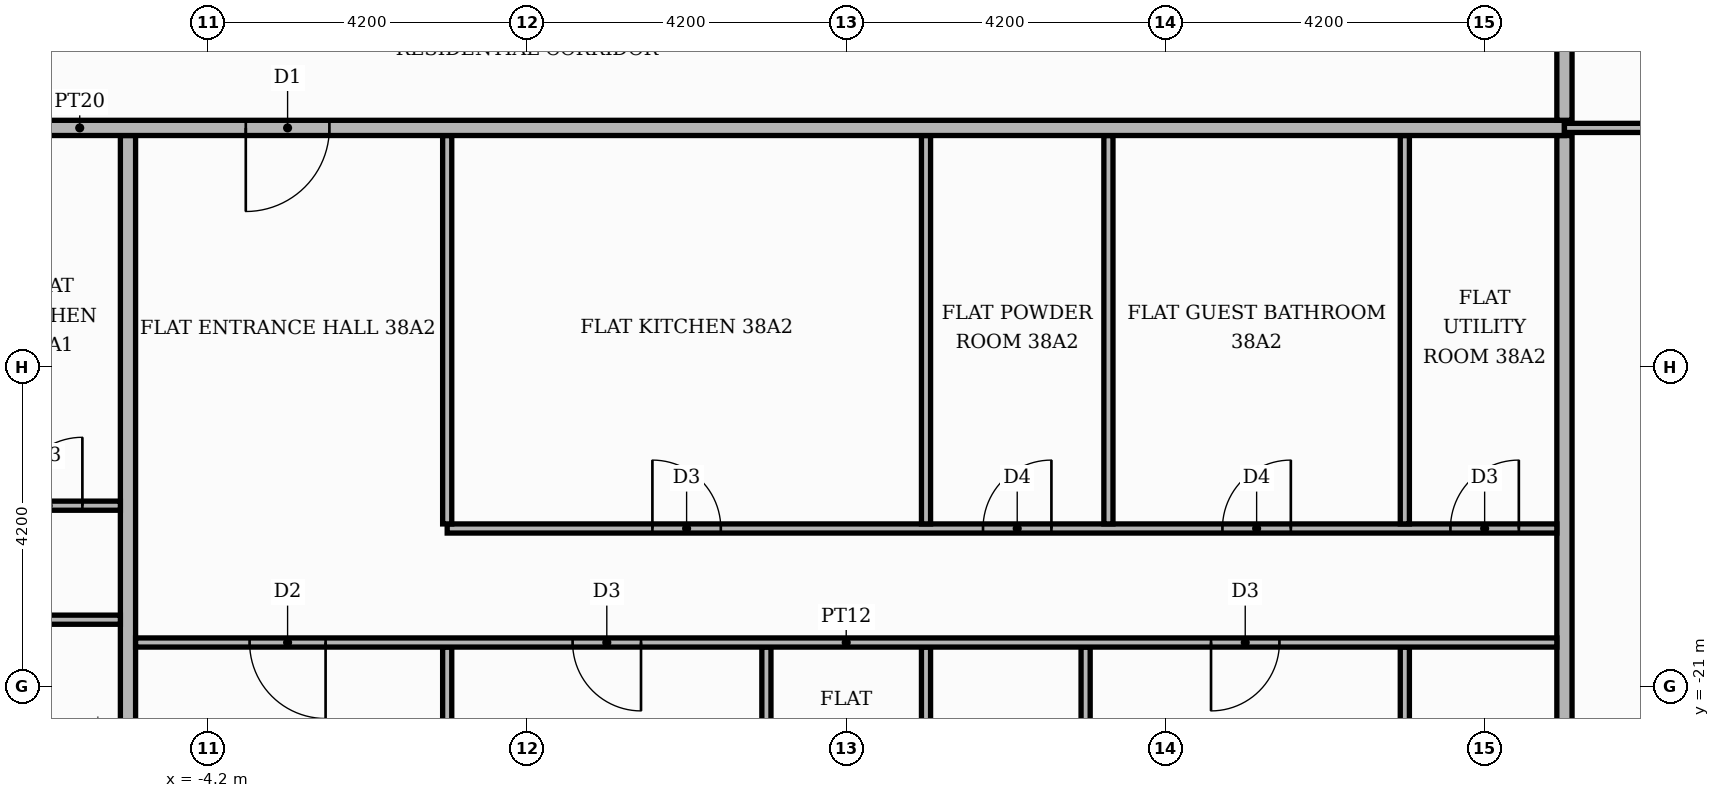
"""IFC4 building model, lengths in metres.
Left out: names, types, materials, properties, quantities, classifications, styles, units other than length and angle.
Written with IfcOpenShell. Run it as: python <this file> out.ifc"""

import sys

from ifc_helpers import new_model, si_unit, direction, frame, frame_2d, origin, place, context, subcontext, project, spatial, rectangle, extrude, element, fill, save


model = new_model("IFC4")
c1 = context("Model", 3, precision=1e-05, world=origin(), true_north=direction((0.0, 1.0)))
c2 = subcontext(c1, "Body", "Model", "MODEL_VIEW")
j1 = project(units=[si_unit("LENGTHUNIT", "METRE"), si_unit("PLANEANGLEUNIT", "RADIAN")], contexts=[c1])
p1 = place(None, origin())
s1 = spatial("IfcSite", under=j1, at=p1, CompositionType="ELEMENT")
p2 = place(p1, origin())
s2 = spatial("IfcBuilding", under=s1, at=p2, CompositionType="ELEMENT")
p3 = place(p2, frame((0.0, 0.0, 161.1)))
s3 = spatial("IfcBuildingStorey", under=s2, at=p3, CompositionType="ELEMENT", Elevation=161.1)
p4 = place(p3, frame((-5.25, -25.42, 0.0), z_axis=(0.0, 0.0, 1.0), x_axis=(0.0, 1.0, 0.0)))
e1 = element("IfcWall", 1, at=p4, inside=s3, PredefinedType="PARTITIONING", context=c2, shape_type="SweptSolid", body=[
    extrude(rectangle(XDim=11.67, YDim=0.2, at=frame_2d((5.835, 0.0))), origin(), (0.0, 0.0, 1.0), 3.48),
])
p5 = place(p3, frame((-1.05, -25.42, 0.0), z_axis=(0.0, 0.0, 1.0), x_axis=(0.0, 1.0, 0.0)))
e2 = element("IfcWall", 2, at=p5, inside=s3, PredefinedType="PARTITIONING", context=c2, shape_type="SweptSolid", body=[
    extrude(rectangle(XDim=4.94, YDim=0.12, at=frame_2d((2.47, 0.0))), origin(), (0.0, 0.0, 1.0), 3.48),
])
p6 = place(p3, frame((3.15, -25.42, 0.0), z_axis=(0.0, 0.0, 1.0), x_axis=(0.0, 1.0, 0.0)))
e3 = element("IfcWall", 3, at=p6, inside=s3, PredefinedType="PARTITIONING", context=c2, shape_type="SweptSolid", body=[
    extrude(rectangle(XDim=4.94, YDim=0.12, at=frame_2d((2.47, 0.0))), origin(), (0.0, 0.0, 1.0), 3.48),
])
p7 = place(p6, frame((1.9, 0.0, 0.0)))
e4 = element("IfcOpeningElement", 4, at=p7, cuts=e3, PredefinedType="OPENING", context=c2, shape_type="SweptSolid", body=[
    extrude(rectangle(XDim=0.9, YDim=2.1, at=frame_2d((0.45, 1.05))), frame((0.0, 0.07, 0.0), z_axis=(0.0, -1.0, 0.0), x_axis=(1.0, 0.0, 0.0)), (0.0, 0.0, 1.0), 0.14),
])
p8 = place(p3, frame((5.25, -25.42, 0.0), z_axis=(0.0, 0.0, 1.0), x_axis=(0.0, 1.0, 0.0)))
e5 = element("IfcWall", 5, at=p8, inside=s3, PredefinedType="PARTITIONING", context=c2, shape_type="SweptSolid", body=[
    extrude(rectangle(XDim=4.94, YDim=0.12, at=frame_2d((2.47, 0.0))), origin(), (0.0, 0.0, 1.0), 3.48),
])
p9 = place(p8, frame((1.9, 0.0, 0.0)))
e6 = element("IfcOpeningElement", 6, at=p9, cuts=e5, PredefinedType="OPENING", context=c2, shape_type="SweptSolid", body=[
    extrude(rectangle(XDim=0.9, YDim=2.1, at=frame_2d((0.45, 1.05))), frame((0.0, 0.07, 0.0), z_axis=(0.0, -1.0, 0.0), x_axis=(1.0, 0.0, 0.0)), (0.0, 0.0, 1.0), 0.14),
])
p10 = place(p3, frame((7.35, -25.42, 0.0), z_axis=(0.0, 0.0, 1.0), x_axis=(0.0, 1.0, 0.0)))
e7 = element("IfcWall", 7, at=p10, inside=s3, PredefinedType="PARTITIONING", context=c2, shape_type="SweptSolid", body=[
    extrude(rectangle(XDim=4.94, YDim=0.12, at=frame_2d((2.47, 0.0))), origin(), (0.0, 0.0, 1.0), 3.48),
])
p11 = place(p3, frame((11.55, -25.42, 0.0), z_axis=(0.0, 0.0, 1.0), x_axis=(0.0, 1.0, 0.0)))
e8 = element("IfcWall", 8, at=p11, inside=s3, PredefinedType="PARTITIONING", context=c2, shape_type="SweptSolid", body=[
    extrude(rectangle(XDim=4.94, YDim=0.12, at=frame_2d((2.47, 0.0))), origin(), (0.0, 0.0, 1.0), 3.48),
])
p12 = place(p11, frame((1.9, 0.0, 0.0)))
e9 = element("IfcOpeningElement", 9, at=p12, cuts=e8, PredefinedType="OPENING", context=c2, shape_type="SweptSolid", body=[
    extrude(rectangle(XDim=0.9, YDim=2.1, at=frame_2d((0.45, 1.05))), frame((0.0, 0.07, 0.0), z_axis=(0.0, -1.0, 0.0), x_axis=(1.0, 0.0, 0.0)), (0.0, 0.0, 1.0), 0.14),
])
p13 = place(p3, frame((13.65, -25.42, 0.0), z_axis=(0.0, 0.0, 1.0), x_axis=(0.0, 1.0, 0.0)))
e10 = element("IfcWall", 10, at=p13, inside=s3, PredefinedType="PARTITIONING", context=c2, shape_type="SweptSolid", body=[
    extrude(rectangle(XDim=11.67, YDim=0.2, at=frame_2d((5.835, 0.0))), origin(), (0.0, 0.0, 1.0), 3.48),
])
p14 = place(p3, frame((-5.15, -20.42, 0.0), z_axis=(0.0, 0.0, 1.0), x_axis=(1.0, 0.0, 0.0)))
e11 = element("IfcWall", 11, at=p14, inside=s3, PredefinedType="PARTITIONING", context=c2, shape_type="SweptSolid", body=[
    extrude(rectangle(XDim=18.7, YDim=0.12, at=frame_2d((9.35, 0.0))), origin(), (0.0, 0.0, 1.0), 3.48),
])
p15 = place(p14, frame((1.5, 0.0, 0.0)))
e12 = element("IfcOpeningElement", 12, at=p15, cuts=e11, PredefinedType="OPENING", context=c2, shape_type="SweptSolid", body=[
    extrude(rectangle(XDim=1.0, YDim=2.1, at=frame_2d((0.5, 1.05))), frame((0.0, 0.07, 0.0), z_axis=(0.0, -1.0, 0.0), x_axis=(1.0, 0.0, 0.0)), (0.0, 0.0, 1.0), 0.14),
])
p16 = place(p14, frame((5.75, 0.0, 0.0)))
e13 = element("IfcOpeningElement", 13, at=p16, cuts=e11, PredefinedType="OPENING", context=c2, shape_type="SweptSolid", body=[
    extrude(rectangle(XDim=0.9, YDim=2.1, at=frame_2d((0.45, 1.05))), frame((0.0, 0.07, 0.0), z_axis=(0.0, -1.0, 0.0), x_axis=(1.0, 0.0, 0.0)), (0.0, 0.0, 1.0), 0.14),
])
p17 = place(p14, frame((14.15, 0.0, 0.0)))
e14 = element("IfcOpeningElement", 14, at=p17, cuts=e11, PredefinedType="OPENING", context=c2, shape_type="SweptSolid", body=[
    extrude(rectangle(XDim=0.9, YDim=2.1, at=frame_2d((0.45, 1.05))), frame((0.0, 0.07, 0.0), z_axis=(0.0, -1.0, 0.0), x_axis=(1.0, 0.0, 0.0)), (0.0, 0.0, 1.0), 0.14),
])
p18 = place(p3, frame((-25.42, -20.12, 0.0), z_axis=(0.0, 0.0, 1.0), x_axis=(1.0, 0.0, 0.0)))
e15 = element("IfcWall", 15, at=p18, inside=s3, PredefinedType="PARTITIONING", context=c2, shape_type="SweptSolid", body=[
    extrude(rectangle(XDim=20.07, YDim=0.12, at=frame_2d((10.035, 0.0))), origin(), (0.0, 0.0, 1.0), 3.48),
])
p19 = place(p18, frame((10.22, 0.0, 0.0)))
e16 = element("IfcOpeningElement", 16, at=p19, cuts=e15, PredefinedType="OPENING", context=c2, shape_type="SweptSolid", body=[
    extrude(rectangle(XDim=1.0, YDim=2.1, at=frame_2d((0.5, 1.05))), frame((0.0, 0.07, 0.0), z_axis=(0.0, -1.0, 0.0), x_axis=(1.0, 0.0, 0.0)), (0.0, 0.0, 1.0), 0.14),
])
p20 = place(p18, frame((13.42, 0.0, 0.0)))
e17 = element("IfcOpeningElement", 17, at=p20, cuts=e15, PredefinedType="OPENING", context=c2, shape_type="SweptSolid", body=[
    extrude(rectangle(XDim=0.9, YDim=2.1, at=frame_2d((0.45, 1.05))), frame((0.0, 0.07, 0.0), z_axis=(0.0, -1.0, 0.0), x_axis=(1.0, 0.0, 0.0)), (0.0, 0.0, 1.0), 0.14),
])
p21 = place(p3, frame((-1.05, -18.92, 0.0), z_axis=(0.0, 0.0, 1.0), x_axis=(1.0, 0.0, 0.0)))
e18 = element("IfcWall", 18, at=p21, inside=s3, PredefinedType="PARTITIONING", context=c2, shape_type="SweptSolid", body=[
    extrude(rectangle(XDim=14.6, YDim=0.12, at=frame_2d((7.3, 0.0))), origin(), (0.0, 0.0, 1.0), 3.48),
])
p22 = place(p21, frame((2.7, 0.0, 0.0)))
e19 = element("IfcOpeningElement", 19, at=p22, cuts=e18, PredefinedType="OPENING", context=c2, shape_type="SweptSolid", body=[
    extrude(rectangle(XDim=0.9, YDim=2.1, at=frame_2d((0.45, 1.05))), frame((0.0, 0.07, 0.0), z_axis=(0.0, -1.0, 0.0), x_axis=(1.0, 0.0, 0.0)), (0.0, 0.0, 1.0), 0.14),
])
p23 = place(p21, frame((7.05, 0.0, 0.0)))
e20 = element("IfcOpeningElement", 20, at=p23, cuts=e18, PredefinedType="OPENING", context=c2, shape_type="SweptSolid", body=[
    extrude(rectangle(XDim=0.9, YDim=2.1, at=frame_2d((0.45, 1.05))), frame((0.0, 0.07, 0.0), z_axis=(0.0, -1.0, 0.0), x_axis=(1.0, 0.0, 0.0)), (0.0, 0.0, 1.0), 0.14),
])
p24 = place(p21, frame((10.2, 0.0, 0.0)))
e21 = element("IfcOpeningElement", 21, at=p24, cuts=e18, PredefinedType="OPENING", context=c2, shape_type="SweptSolid", body=[
    extrude(rectangle(XDim=0.9, YDim=2.1, at=frame_2d((0.45, 1.05))), frame((0.0, 0.07, 0.0), z_axis=(0.0, -1.0, 0.0), x_axis=(1.0, 0.0, 0.0)), (0.0, 0.0, 1.0), 0.14),
])
p25 = place(p21, frame((13.2, 0.0, 0.0)))
e22 = element("IfcOpeningElement", 22, at=p25, cuts=e18, PredefinedType="OPENING", context=c2, shape_type="SweptSolid", body=[
    extrude(rectangle(XDim=0.9, YDim=2.1, at=frame_2d((0.45, 1.05))), frame((0.0, 0.07, 0.0), z_axis=(0.0, -1.0, 0.0), x_axis=(1.0, 0.0, 0.0)), (0.0, 0.0, 1.0), 0.14),
])
for number, where, z_axis, x_axis in (
    (23, (-1.05, -18.86, 0.0), (0.0, 0.0, 1.0), (0.0, 1.0, 0.0)),
    (24, (5.25, -18.86, 0.0), (0.0, 0.0, 1.0), (0.0, 1.0, 0.0)),
    (25, (7.65, -18.86, 0.0), (0.0, 0.0, 1.0), (0.0, 1.0, 0.0)),
    (26, (11.55, -18.86, 0.0), (0.0, 0.0, 1.0), (0.0, 1.0, 0.0)),
):
    element("IfcWall", number, at=place(p3, frame(where, z_axis=z_axis, x_axis=x_axis)), inside=s3, PredefinedType="PARTITIONING", context=c2, shape_type="SweptSolid", body=[
        extrude(rectangle(XDim=5.11, YDim=0.12, at=frame_2d((2.555, 0.0))), origin(), (0.0, 0.0, 1.0), 3.48),
    ])
p26 = place(p3, frame((-9.45, -18.62, 0.0), z_axis=(0.0, 0.0, 1.0), x_axis=(1.0, 0.0, 0.0)))
e27 = element("IfcWall", 27, at=p26, inside=s3, PredefinedType="PARTITIONING", context=c2, shape_type="SweptSolid", body=[
    extrude(rectangle(XDim=4.1, YDim=0.12, at=frame_2d((2.05, 0.0))), origin(), (0.0, 0.0, 1.0), 3.48),
])
p27 = place(p26, frame((2.7, 0.0, 0.0)))
e28 = element("IfcOpeningElement", 28, at=p27, cuts=e27, PredefinedType="OPENING", context=c2, shape_type="SweptSolid", body=[
    extrude(rectangle(XDim=0.9, YDim=2.1, at=frame_2d((0.45, 1.05))), frame((0.0, 0.07, 0.0), z_axis=(0.0, -1.0, 0.0), x_axis=(1.0, 0.0, 0.0)), (0.0, 0.0, 1.0), 0.14),
])
p28 = place(p3, frame((-25.42, -13.65, 0.0), z_axis=(0.0, 0.0, 1.0), x_axis=(1.0, 0.0, 0.0)))
e29 = element("IfcWall", 29, at=p28, inside=s3, PredefinedType="PARTITIONING", context=c2, shape_type="SweptSolid", body=[
    extrude(rectangle(XDim=39.07, YDim=0.2, at=frame_2d((19.535, 0.0))), origin(), (0.0, 0.0, 1.0), 3.48),
])
p29 = place(p28, frame((13.32, 0.0, 0.0)))
e30 = element("IfcOpeningElement", 30, at=p29, cuts=e29, PredefinedType="OPENING", context=c2, shape_type="SweptSolid", body=[
    extrude(rectangle(XDim=1.1, YDim=2.4, at=frame_2d((0.55, 1.2))), frame((0.0, 0.11, 0.0), z_axis=(0.0, -1.0, 0.0), x_axis=(1.0, 0.0, 0.0)), (0.0, 0.0, 1.0), 0.22),
])
p30 = place(p28, frame((21.72, 0.0, 0.0)))
e31 = element("IfcOpeningElement", 31, at=p30, cuts=e29, PredefinedType="OPENING", context=c2, shape_type="SweptSolid", body=[
    extrude(rectangle(XDim=1.1, YDim=2.4, at=frame_2d((0.55, 1.2))), frame((0.0, 0.11, 0.0), z_axis=(0.0, -1.0, 0.0), x_axis=(1.0, 0.0, 0.0)), (0.0, 0.0, 1.0), 0.22),
])
p31 = place(p3, frame((13.65, -13.65, 0.0), z_axis=(0.0, 0.0, 1.0), x_axis=(1.0, 0.0, 0.0)))
e32 = element("IfcWall", 32, at=p31, inside=s3, PredefinedType="PARTITIONING", context=c2, shape_type="SweptSolid", body=[
    extrude(rectangle(XDim=6.47, YDim=0.12, at=frame_2d((3.235, 0.0))), origin(), (0.0, 0.0, 1.0), 3.48),
])
p32 = place(p31, frame((2.785, 0.0, 0.0)))
e33 = element("IfcOpeningElement", 33, at=p32, cuts=e32, PredefinedType="OPENING", context=c2, shape_type="SweptSolid", body=[
    extrude(rectangle(XDim=0.9, YDim=2.1, at=frame_2d((0.45, 1.05))), frame((0.0, 0.07, 0.0), z_axis=(0.0, -1.0, 0.0), x_axis=(1.0, 0.0, 0.0)), (0.0, 0.0, 1.0), 0.14),
])
p33 = place(p3, frame((13.65, -13.55, 0.0), z_axis=(0.0, 0.0, 1.0), x_axis=(0.0, 1.0, 0.0)))
e34 = element("IfcWall", 34, at=p33, inside=s3, PredefinedType="PARTITIONING", context=c2, shape_type="SweptSolid", body=[
    extrude(rectangle(XDim=2.45, YDim=0.2, at=frame_2d((1.225, 0.0))), origin(), (0.0, 0.0, 1.0), 3.48),
])
p34 = place(p27, origin())
e35 = element("IfcDoor", 35, at=p34, inside=s3, OperationType="SINGLE_SWING_RIGHT", PredefinedType="DOOR", context=c2, shape_type="SweptSolid", body=[
    extrude(rectangle(XDim=0.9, YDim=2.1, at=frame_2d((0.45, 1.05))), frame((0.0, 0.025, 0.0), z_axis=(0.0, -1.0, 0.0), x_axis=(1.0, 0.0, 0.0)), (0.0, 0.0, 1.0), 0.05),
])
fill(e28, e35)
p35 = place(p30, frame((1.1, 0.0, 0.0), z_axis=(0.0, 0.0, 1.0), x_axis=(-1.0, 0.0, 0.0)))
e36 = element("IfcDoor", 36, at=p35, inside=s3, OperationType="SINGLE_SWING_LEFT", PredefinedType="DOOR", context=c2, shape_type="SweptSolid", body=[
    extrude(rectangle(XDim=1.1, YDim=2.4, at=frame_2d((0.55, 1.2))), frame((0.0, 0.025, 0.0), z_axis=(0.0, -1.0, 0.0), x_axis=(1.0, 0.0, 0.0)), (0.0, 0.0, 1.0), 0.05),
])
fill(e31, e36)
p36 = place(p22, origin())
e37 = element("IfcDoor", 37, at=p36, inside=s3, OperationType="SINGLE_SWING_LEFT", PredefinedType="DOOR", context=c2, shape_type="SweptSolid", body=[
    extrude(rectangle(XDim=0.9, YDim=2.1, at=frame_2d((0.45, 1.05))), frame((0.0, 0.025, 0.0), z_axis=(0.0, -1.0, 0.0), x_axis=(1.0, 0.0, 0.0)), (0.0, 0.0, 1.0), 0.05),
])
fill(e19, e37)
p37 = place(p23, origin())
e38 = element("IfcDoor", 38, at=p37, inside=s3, OperationType="SINGLE_SWING_RIGHT", PredefinedType="DOOR", context=c2, shape_type="SweptSolid", body=[
    extrude(rectangle(XDim=0.9, YDim=2.1, at=frame_2d((0.45, 1.05))), frame((0.0, 0.025, 0.0), z_axis=(0.0, -1.0, 0.0), x_axis=(1.0, 0.0, 0.0)), (0.0, 0.0, 1.0), 0.05),
])
fill(e20, e38)
p38 = place(p24, origin())
e39 = element("IfcDoor", 39, at=p38, inside=s3, OperationType="SINGLE_SWING_RIGHT", PredefinedType="DOOR", context=c2, shape_type="SweptSolid", body=[
    extrude(rectangle(XDim=0.9, YDim=2.1, at=frame_2d((0.45, 1.05))), frame((0.0, 0.025, 0.0), z_axis=(0.0, -1.0, 0.0), x_axis=(1.0, 0.0, 0.0)), (0.0, 0.0, 1.0), 0.05),
])
fill(e21, e39)
p39 = place(p25, origin())
e40 = element("IfcDoor", 40, at=p39, inside=s3, OperationType="SINGLE_SWING_RIGHT", PredefinedType="DOOR", context=c2, shape_type="SweptSolid", body=[
    extrude(rectangle(XDim=0.9, YDim=2.1, at=frame_2d((0.45, 1.05))), frame((0.0, 0.025, 0.0), z_axis=(0.0, -1.0, 0.0), x_axis=(1.0, 0.0, 0.0)), (0.0, 0.0, 1.0), 0.05),
])
fill(e22, e40)
p40 = place(p15, frame((1.0, 0.0, 0.0), z_axis=(0.0, 0.0, 1.0), x_axis=(-1.0, 0.0, 0.0)))
e41 = element("IfcDoor", 41, at=p40, inside=s3, OperationType="SINGLE_SWING_RIGHT", PredefinedType="DOOR", context=c2, shape_type="SweptSolid", body=[
    extrude(rectangle(XDim=1.0, YDim=2.1, at=frame_2d((0.5, 1.05))), frame((0.0, 0.025, 0.0), z_axis=(0.0, -1.0, 0.0), x_axis=(1.0, 0.0, 0.0)), (0.0, 0.0, 1.0), 0.05),
])
fill(e12, e41)
p41 = place(p16, frame((0.9, 0.0, 0.0), z_axis=(0.0, 0.0, 1.0), x_axis=(-1.0, 0.0, 0.0)))
e42 = element("IfcDoor", 42, at=p41, inside=s3, OperationType="SINGLE_SWING_RIGHT", PredefinedType="DOOR", context=c2, shape_type="SweptSolid", body=[
    extrude(rectangle(XDim=0.9, YDim=2.1, at=frame_2d((0.45, 1.05))), frame((0.0, 0.025, 0.0), z_axis=(0.0, -1.0, 0.0), x_axis=(1.0, 0.0, 0.0)), (0.0, 0.0, 1.0), 0.05),
])
fill(e13, e42)
p42 = place(p17, frame((0.9, 0.0, 0.0), z_axis=(0.0, 0.0, 1.0), x_axis=(-1.0, 0.0, 0.0)))
e43 = element("IfcDoor", 43, at=p42, inside=s3, OperationType="SINGLE_SWING_LEFT", PredefinedType="DOOR", context=c2, shape_type="SweptSolid", body=[
    extrude(rectangle(XDim=0.9, YDim=2.1, at=frame_2d((0.45, 1.05))), frame((0.0, 0.025, 0.0), z_axis=(0.0, -1.0, 0.0), x_axis=(1.0, 0.0, 0.0)), (0.0, 0.0, 1.0), 0.05),
])
fill(e14, e43)
save(model, sys.argv[1])
